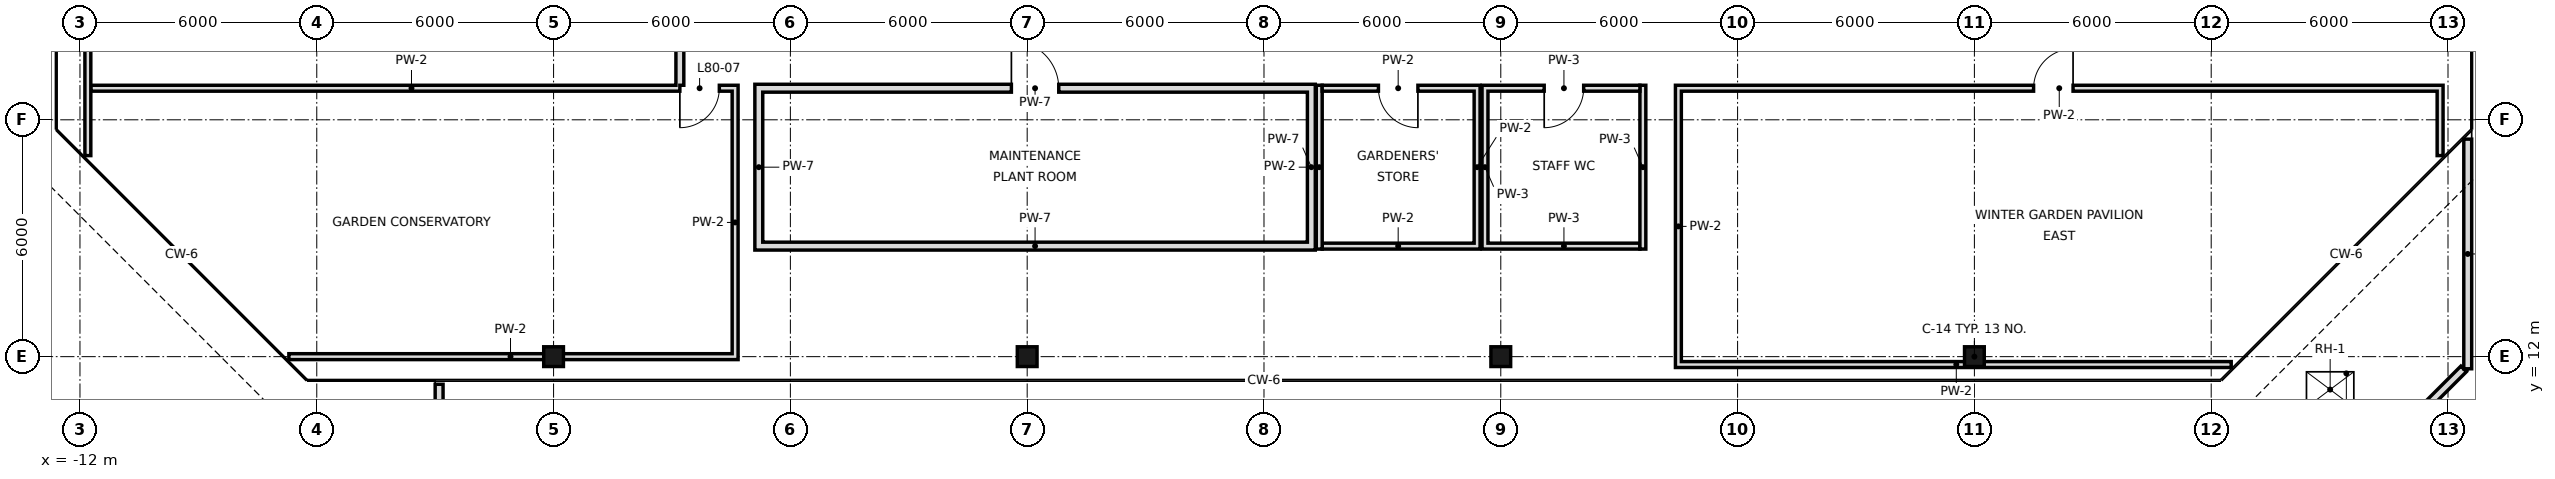
"""IFC4 building model, lengths in metres.
Left out: names, types, materials, properties, quantities, classifications, styles, units other than length and angle.
Written with IfcOpenShell. Run it as: python <this file> out.ifc"""

import sys

from ifc_helpers import new_model, si_unit, direction, frame, frame_2d, origin, origin_2d, place, context, subcontext, project, spatial, rectangle, hollow_rectangle, extrude, element, fill, save


model = new_model("IFC4")
c1 = context("Model", 3, precision=1e-05, world=origin(), true_north=direction((0.0, 1.0)))
c2 = subcontext(c1, "Body", "Model", "MODEL_VIEW")
j1 = project(units=[si_unit("LENGTHUNIT", "METRE"), si_unit("PLANEANGLEUNIT", "RADIAN")], contexts=[c1])
p1 = place(None, origin())
s1 = spatial("IfcSite", under=j1, at=p1, CompositionType="ELEMENT")
p2 = place(p1, origin())
s2 = spatial("IfcBuilding", under=s1, at=p2, CompositionType="ELEMENT")
p3 = place(p2, frame((0.0, 0.0, 337.8)))
s3 = spatial("IfcBuildingStorey", under=s2, at=p3, CompositionType="ELEMENT", Elevation=337.8)
for number, where, z_axis, x_axis in (
    (1, (0.0, 12.0, 0.0), (0.0, 0.0, 1.0), (1.0, 0.0, 0.0)),
    (2, (12.0, 12.0, 0.0), (0.0, 0.0, 1.0), (1.0, 0.0, 0.0)),
    (3, (24.0, 12.0, 0.0), (0.0, 0.0, 1.0), (1.0, 0.0, 0.0)),
    (4, (36.0, 12.0, 0.0), (0.0, 0.0, 1.0), (1.0, 0.0, 0.0)),
):
    element("IfcColumn", number, at=place(p3, frame(where, z_axis=z_axis, x_axis=x_axis)), inside=s3, PredefinedType="COLUMN", context=c2, shape_type="SweptSolid", body=[
        extrude(hollow_rectangle(XDim=0.5, YDim=0.5, WallThickness=0.025, at=origin_2d()), origin(), (0.0, 0.0, 1.0), 4.0),
    ])
p4 = place(p3, frame((48.5, 17.51, 0.0), z_axis=(0.0, 0.0, 1.0), x_axis=(0.0, -1.0, 0.0)))
e5 = element("IfcWall", 5, at=p4, inside=s3, PredefinedType="PARAPET", context=c2, shape_type="SweptSolid", body=[
    extrude(rectangle(XDim=5.817, YDim=0.2, at=frame_2d((2.909, 0.0))), origin(), (0.0, 0.0, 1.0), 1.1),
])
p5 = place(p3, frame((48.397, 11.69, 0.0), z_axis=(0.0, 0.0, 1.0), x_axis=(-0.707106781187, -0.707106781187, 0.0)))
e6 = element("IfcWall", 6, at=p5, inside=s3, PredefinedType="PARAPET", context=c2, shape_type="SweptSolid", body=[
    extrude(rectangle(XDim=8.61, YDim=0.2, at=frame_2d((4.305, 0.0))), origin(), (0.0, 0.0, 1.0), 1.1),
])
p6 = place(p3, frame((-2.9, 5.6, 0.0), z_axis=(0.0, 0.0, 1.0), x_axis=(0.0, 1.0, 0.0)))
e7 = element("IfcWall", 7, at=p6, inside=s3, PredefinedType="PARAPET", context=c2, shape_type="SweptSolid", body=[
    extrude(rectangle(XDim=5.7, YDim=0.2, at=frame_2d((2.85, 0.0))), origin(), (0.0, 0.0, 1.0), 1.1),
])
p7 = place(p3, frame((-11.8, 17.093, 0.0), z_axis=(0.0, 0.0, 1.0), x_axis=(0.0, 1.0, 0.0)))
e8 = element("IfcWall", 8, at=p7, inside=s3, PredefinedType="PARTITIONING", context=c2, shape_type="SweptSolid", body=[
    extrude(rectangle(XDim=6.807, YDim=0.15, at=frame_2d((3.403, 0.0))), origin(), (0.0, 0.0, 1.0), 3.05),
])
p8 = place(p3, frame((3.2, 18.875, 0.0), z_axis=(0.0, 0.0, 1.0), x_axis=(0.0, 1.0, 0.0)))
e9 = element("IfcWall", 9, at=p8, inside=s3, PredefinedType="SOLIDWALL", context=c2, shape_type="SweptSolid", body=[
    extrude(rectangle(XDim=11.225, YDim=0.2, at=frame_2d((5.613, 0.0))), origin(), (0.0, 0.0, 1.0), 3.3),
])
p9 = place(p8, frame((2.025, 0.0, 0.0)))
e10 = element("IfcOpeningElement", 10, at=p9, cuts=e9, PredefinedType="OPENING", context=c2, shape_type="SweptSolid", body=[
    extrude(rectangle(XDim=1.0, YDim=2.4, at=frame_2d((0.5, 1.2))), frame((0.0, 0.11, 0.0), z_axis=(0.0, -1.0, 0.0), x_axis=(1.0, 0.0, 0.0)), (0.0, 0.0, 1.0), 0.22),
])
p10 = place(p8, frame((7.525, 0.0, 0.0)))
e11 = element("IfcOpeningElement", 11, at=p10, cuts=e9, PredefinedType="OPENING", context=c2, shape_type="SweptSolid", body=[
    extrude(rectangle(XDim=1.2, YDim=2.4, at=frame_2d((0.6, 1.2))), frame((0.0, 0.11, 0.0), z_axis=(0.0, -1.0, 0.0), x_axis=(1.0, 0.0, 0.0)), (0.0, 0.0, 1.0), 0.22),
])
p11 = place(p3, frame((4.6, 11.925, 0.0), z_axis=(0.0, 0.0, 1.0), x_axis=(0.0, 1.0, 0.0)))
e12 = element("IfcWall", 12, at=p11, inside=s3, PredefinedType="PARTITIONING", context=c2, shape_type="SweptSolid", body=[
    extrude(rectangle(XDim=6.95, YDim=0.15, at=frame_2d((3.475, 0.0))), origin(), (0.0, 0.0, 1.0), 3.75),
])
p12 = place(p3, frame((5.2, 14.7, 0.0), z_axis=(0.0, 0.0, 1.0), x_axis=(0.0, 1.0, 0.0)))
e13 = element("IfcWall", 13, at=p12, inside=s3, PredefinedType="SOLIDWALL", context=c2, shape_type="SweptSolid", body=[
    extrude(rectangle(XDim=4.2, YDim=0.2, at=frame_2d((2.1, 0.0))), origin(), (0.0, 0.0, 1.0), 3.3),
])
p13 = place(p3, frame((19.2, 14.7, 0.0), z_axis=(0.0, 0.0, 1.0), x_axis=(0.0, 1.0, 0.0)))
e14 = element("IfcWall", 14, at=p13, inside=s3, PredefinedType="SOLIDWALL", context=c2, shape_type="SweptSolid", body=[
    extrude(rectangle(XDim=4.2, YDim=0.2, at=frame_2d((2.1, 0.0))), origin(), (0.0, 0.0, 1.0), 3.05),
])
for number, where, z_axis, x_axis in (
    (15, (19.4, 14.725, 0.0), (0.0, 0.0, 1.0), (0.0, 1.0, 0.0)),
    (16, (23.4, 14.725, 0.0), (0.0, 0.0, 1.0), (0.0, 1.0, 0.0)),
    (17, (23.6, 14.725, 0.0), (0.0, 0.0, 1.0), (0.0, 1.0, 0.0)),
    (18, (27.6, 14.725, 0.0), (0.0, 0.0, 1.0), (0.0, 1.0, 0.0)),
):
    element("IfcWall", number, at=place(p3, frame(where, z_axis=z_axis, x_axis=x_axis)), inside=s3, PredefinedType="PARTITIONING", context=c2, shape_type="SweptSolid", body=[
        extrude(rectangle(XDim=4.15, YDim=0.15, at=frame_2d((2.075, 0.0))), origin(), (0.0, 0.0, 1.0), 3.75),
    ])
p14 = place(p3, frame((28.5, 11.725, 0.0), z_axis=(0.0, 0.0, 1.0), x_axis=(0.0, 1.0, 0.0)))
e19 = element("IfcWall", 19, at=p14, inside=s3, PredefinedType="PARTITIONING", context=c2, shape_type="SweptSolid", body=[
    extrude(rectangle(XDim=7.15, YDim=0.15, at=frame_2d((3.575, 0.0))), origin(), (0.0, 0.0, 1.0), 3.75),
])
p15 = place(p3, frame((47.8, 17.093, 0.0), z_axis=(0.0, 0.0, 1.0), x_axis=(0.0, 1.0, 0.0)))
e20 = element("IfcWall", 20, at=p15, inside=s3, PredefinedType="PARTITIONING", context=c2, shape_type="SweptSolid", body=[
    extrude(rectangle(XDim=1.782, YDim=0.15, at=frame_2d((0.891, 0.0))), origin(), (0.0, 0.0, 1.0), 3.05),
])
p16 = place(p3, frame((28.575, 11.8, 0.0), z_axis=(0.0, 0.0, 1.0), x_axis=(1.0, 0.0, 0.0)))
e21 = element("IfcWall", 21, at=p16, inside=s3, PredefinedType="PARTITIONING", context=c2, shape_type="SweptSolid", body=[
    extrude(rectangle(XDim=13.932, YDim=0.15, at=frame_2d((6.966, 0.0))), origin(), (0.0, 0.0, 1.0), 3.05),
])
p17 = place(p3, frame((-6.707, 12.0, 0.0), z_axis=(0.0, 0.0, 1.0), x_axis=(1.0, 0.0, 0.0)))
e22 = element("IfcWall", 22, at=p17, inside=s3, PredefinedType="PARTITIONING", context=c2, shape_type="SweptSolid", body=[
    extrude(rectangle(XDim=11.232, YDim=0.15, at=frame_2d((5.616, 0.0))), origin(), (0.0, 0.0, 1.0), 3.05),
])
p18 = place(p3, frame((5.3, 14.8, 0.0), z_axis=(0.0, 0.0, 1.0), x_axis=(1.0, 0.0, 0.0)))
e23 = element("IfcWall", 23, at=p18, inside=s3, PredefinedType="SOLIDWALL", context=c2, shape_type="SweptSolid", body=[
    extrude(rectangle(XDim=13.8, YDim=0.2, at=frame_2d((6.9, 0.0))), origin(), (0.0, 0.0, 1.0), 3.05),
])
for number, where, z_axis, x_axis in (
    (24, (19.475, 14.8, 0.0), (0.0, 0.0, 1.0), (1.0, 0.0, 0.0)),
    (25, (23.675, 14.8, 0.0), (0.0, 0.0, 1.0), (1.0, 0.0, 0.0)),
):
    element("IfcWall", number, at=place(p3, frame(where, z_axis=z_axis, x_axis=x_axis)), inside=s3, PredefinedType="PARTITIONING", context=c2, shape_type="SweptSolid", body=[
        extrude(rectangle(XDim=3.85, YDim=0.15, at=frame_2d((1.925, 0.0))), origin(), (0.0, 0.0, 1.0), 3.75),
    ])
p19 = place(p3, frame((-11.725, 18.8, 0.0), z_axis=(0.0, 0.0, 1.0), x_axis=(1.0, 0.0, 0.0)))
e26 = element("IfcWall", 26, at=p19, inside=s3, PredefinedType="PARTITIONING", context=c2, shape_type="SweptSolid", body=[
    extrude(rectangle(XDim=16.25, YDim=0.15, at=frame_2d((8.125, 0.0))), origin(), (0.0, 0.0, 1.0), 3.75),
])
p20 = place(p19, frame((14.925, 0.0, 0.0)))
e27 = element("IfcOpeningElement", 27, at=p20, cuts=e26, PredefinedType="OPENING", context=c2, shape_type="SweptSolid", body=[
    extrude(rectangle(XDim=1.0, YDim=2.4, at=frame_2d((0.5, 1.2))), frame((0.0, 0.085, 0.0), z_axis=(0.0, -1.0, 0.0), x_axis=(1.0, 0.0, 0.0)), (0.0, 0.0, 1.0), 0.17),
])
p21 = place(p3, frame((5.3, 18.8, 0.0), z_axis=(0.0, 0.0, 1.0), x_axis=(1.0, 0.0, 0.0)))
e28 = element("IfcWall", 28, at=p21, inside=s3, PredefinedType="SOLIDWALL", context=c2, shape_type="SweptSolid", body=[
    extrude(rectangle(XDim=13.8, YDim=0.2, at=frame_2d((6.9, 0.0))), origin(), (0.0, 0.0, 1.0), 3.05),
])
p22 = place(p21, frame((6.3, 0.0, 0.0)))
e29 = element("IfcOpeningElement", 29, at=p22, cuts=e28, PredefinedType="OPENING", context=c2, shape_type="SweptSolid", body=[
    extrude(rectangle(XDim=1.2, YDim=2.4, at=frame_2d((0.6, 1.2))), frame((0.0, 0.11, 0.0), z_axis=(0.0, -1.0, 0.0), x_axis=(1.0, 0.0, 0.0)), (0.0, 0.0, 1.0), 0.22),
])
p23 = place(p3, frame((19.475, 18.8, 0.0), z_axis=(0.0, 0.0, 1.0), x_axis=(1.0, 0.0, 0.0)))
e30 = element("IfcWall", 30, at=p23, inside=s3, PredefinedType="PARTITIONING", context=c2, shape_type="SweptSolid", body=[
    extrude(rectangle(XDim=3.85, YDim=0.15, at=frame_2d((1.925, 0.0))), origin(), (0.0, 0.0, 1.0), 3.75),
])
p24 = place(p23, frame((1.425, 0.0, 0.0)))
e31 = element("IfcOpeningElement", 31, at=p24, cuts=e30, PredefinedType="OPENING", context=c2, shape_type="SweptSolid", body=[
    extrude(rectangle(XDim=1.0, YDim=2.4, at=frame_2d((0.5, 1.2))), frame((0.0, 0.085, 0.0), z_axis=(0.0, -1.0, 0.0), x_axis=(1.0, 0.0, 0.0)), (0.0, 0.0, 1.0), 0.17),
])
p25 = place(p3, frame((23.675, 18.8, 0.0), z_axis=(0.0, 0.0, 1.0), x_axis=(1.0, 0.0, 0.0)))
e32 = element("IfcWall", 32, at=p25, inside=s3, PredefinedType="PARTITIONING", context=c2, shape_type="SweptSolid", body=[
    extrude(rectangle(XDim=3.85, YDim=0.15, at=frame_2d((1.925, 0.0))), origin(), (0.0, 0.0, 1.0), 3.75),
])
p26 = place(p25, frame((1.425, 0.0, 0.0)))
e33 = element("IfcOpeningElement", 33, at=p26, cuts=e32, PredefinedType="OPENING", context=c2, shape_type="SweptSolid", body=[
    extrude(rectangle(XDim=1.0, YDim=2.4, at=frame_2d((0.5, 1.2))), frame((0.0, 0.085, 0.0), z_axis=(0.0, -1.0, 0.0), x_axis=(1.0, 0.0, 0.0)), (0.0, 0.0, 1.0), 0.17),
])
p27 = place(p3, frame((28.575, 18.8, 0.0), z_axis=(0.0, 0.0, 1.0), x_axis=(1.0, 0.0, 0.0)))
e34 = element("IfcWall", 34, at=p27, inside=s3, PredefinedType="PARTITIONING", context=c2, shape_type="SweptSolid", body=[
    extrude(rectangle(XDim=19.15, YDim=0.15, at=frame_2d((9.575, 0.0))), origin(), (0.0, 0.0, 1.0), 3.75),
])
p28 = place(p27, frame((8.925, 0.0, 0.0)))
e35 = element("IfcOpeningElement", 35, at=p28, cuts=e34, PredefinedType="OPENING", context=c2, shape_type="SweptSolid", body=[
    extrude(rectangle(XDim=1.0, YDim=2.4, at=frame_2d((0.5, 1.2))), frame((0.0, 0.085, 0.0), z_axis=(0.0, -1.0, 0.0), x_axis=(1.0, 0.0, 0.0)), (0.0, 0.0, 1.0), 0.17),
])
p29 = place(p3, frame((0.0, 0.0, -0.25)))
p30 = place(p29, frame((45.014, 11.166, 0.0)))
p31 = place(p30, frame((0.0, 0.0, 0.2)))
e36 = element("IfcWindow", 36, at=p31, inside=s3, PartitioningType="SINGLE_PANEL", PredefinedType="SKYLIGHT", context=c2, shape_type="SweptSolid", body=[
    extrude(rectangle(XDim=0.9, YDim=1.2, at=origin_2d()), origin(), (0.0, 0.0, 1.0), 0.05),
])
p32 = place(p22, origin())
e37 = element("IfcDoor", 37, at=p32, inside=s3, OperationType="SINGLE_SWING_LEFT", PredefinedType="DOOR", context=c2, shape_type="SweptSolid", body=[
    extrude(rectangle(XDim=1.2, YDim=2.4, at=frame_2d((0.6, 1.2))), frame((0.0, 0.025, 0.0), z_axis=(0.0, -1.0, 0.0), x_axis=(1.0, 0.0, 0.0)), (0.0, 0.0, 1.0), 0.05),
])
fill(e29, e37)
p33 = place(p24, origin())
e38 = element("IfcDoor", 38, at=p33, inside=s3, OperationType="SINGLE_SWING_RIGHT", PredefinedType="DOOR", context=c2, shape_type="SweptSolid", body=[
    extrude(rectangle(XDim=1.0, YDim=2.4, at=frame_2d((0.5, 1.2))), frame((0.0, 0.025, 0.0), z_axis=(0.0, -1.0, 0.0), x_axis=(1.0, 0.0, 0.0)), (0.0, 0.0, 1.0), 0.05),
])
fill(e31, e38)
p34 = place(p26, frame((1.0, 0.0, 0.0), z_axis=(0.0, 0.0, 1.0), x_axis=(-1.0, 0.0, 0.0)))
e39 = element("IfcDoor", 39, at=p34, inside=s3, OperationType="SINGLE_SWING_RIGHT", PredefinedType="DOOR", context=c2, shape_type="SweptSolid", body=[
    extrude(rectangle(XDim=1.0, YDim=2.4, at=frame_2d((0.5, 1.2))), frame((0.0, 0.025, 0.0), z_axis=(0.0, -1.0, 0.0), x_axis=(1.0, 0.0, 0.0)), (0.0, 0.0, 1.0), 0.05),
])
fill(e33, e39)
p35 = place(p28, frame((1.0, 0.0, 0.0), z_axis=(0.0, 0.0, 1.0), x_axis=(-1.0, 0.0, 0.0)))
e40 = element("IfcDoor", 40, at=p35, inside=s3, OperationType="SINGLE_SWING_LEFT", PredefinedType="DOOR", context=c2, shape_type="SweptSolid", body=[
    extrude(rectangle(XDim=1.0, YDim=2.4, at=frame_2d((0.5, 1.2))), frame((0.0, 0.025, 0.0), z_axis=(0.0, -1.0, 0.0), x_axis=(1.0, 0.0, 0.0)), (0.0, 0.0, 1.0), 0.05),
])
fill(e35, e40)
p36 = place(p20, frame((1.0, 0.0, 0.0), z_axis=(0.0, 0.0, 1.0), x_axis=(-1.0, 0.0, 0.0)))
e41 = element("IfcDoor", 41, at=p36, inside=s3, OperationType="SINGLE_SWING_RIGHT", PredefinedType="DOOR", context=c2, shape_type="SweptSolid", body=[
    extrude(rectangle(XDim=1.0, YDim=2.4, at=frame_2d((0.5, 1.2))), frame((0.0, 0.025, 0.0), z_axis=(0.0, -1.0, 0.0), x_axis=(1.0, 0.0, 0.0)), (0.0, 0.0, 1.0), 0.05),
])
fill(e27, e41)
save(model, sys.argv[1])
